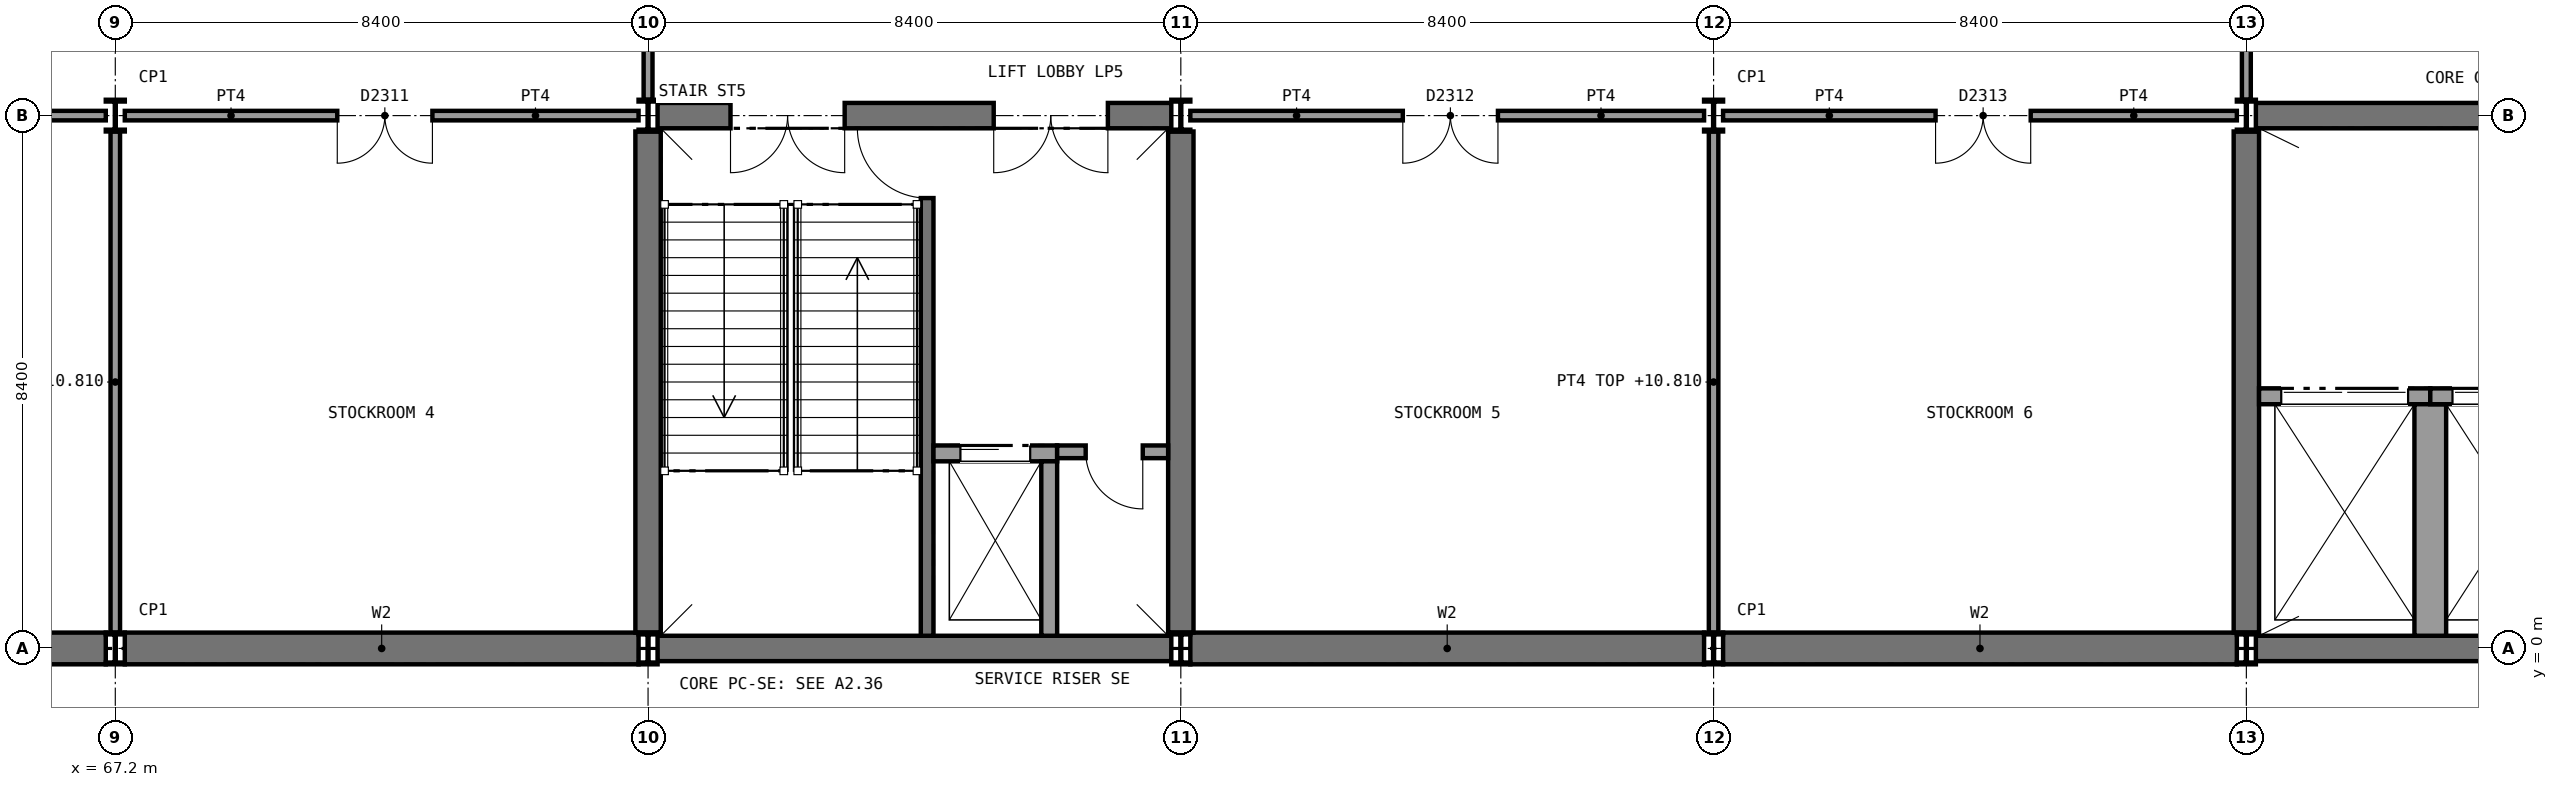
"""IFC4 building model, lengths in metres.
Left out: names, types, materials, properties, quantities, classifications, styles, units other than length and angle.
Written with IfcOpenShell. Run it as: python <this file> out.ifc"""

import sys

from ifc_helpers import new_model, si_unit, direction, frame, frame_2d, origin, origin_2d, place, context, subcontext, project, spatial, rectangle, i_section, extrude, element, fill, save


model = new_model("IFC4")
c1 = context("Model", 3, precision=1e-05, world=origin(), true_north=direction((0.0, 1.0)))
c2 = subcontext(c1, "Body", "Model", "MODEL_VIEW")
j1 = project(units=[si_unit("LENGTHUNIT", "METRE"), si_unit("PLANEANGLEUNIT", "RADIAN")], contexts=[c1])
p1 = place(None, origin())
s1 = spatial("IfcSite", under=j1, at=p1, CompositionType="ELEMENT")
p2 = place(p1, origin())
s2 = spatial("IfcBuilding", under=s1, at=p2, CompositionType="ELEMENT")
p3 = place(p2, frame((0.0, 0.0, 6.0)))
s3 = spatial("IfcBuildingStorey", under=s2, at=p3, CompositionType="ELEMENT", Elevation=6.0)
p4 = place(p3, frame((58.95, 0.0, 0.0), z_axis=(0.0, 0.0, 1.0), x_axis=(1.0, 0.0, 0.0)))
e1 = element("IfcWall", 1, at=p4, inside=s3, PredefinedType="SHEAR", context=c2, shape_type="SweptSolid", body=[
    extrude(rectangle(XDim=8.1, YDim=0.5, at=frame_2d((4.05, 0.0))), origin(), (0.0, 0.0, 1.0), 5.25),
])
p5 = place(p3, frame((67.35, 0.0, 0.0), z_axis=(0.0, 0.0, 1.0), x_axis=(1.0, 0.0, 0.0)))
e2 = element("IfcWall", 2, at=p5, inside=s3, PredefinedType="SHEAR", context=c2, shape_type="SweptSolid", body=[
    extrude(rectangle(XDim=8.1, YDim=0.5, at=frame_2d((4.05, 0.0))), origin(), (0.0, 0.0, 1.0), 5.25),
])
p6 = place(p3, frame((84.15, 0.0, 0.0), z_axis=(0.0, 0.0, 1.0), x_axis=(1.0, 0.0, 0.0)))
e3 = element("IfcWall", 3, at=p6, inside=s3, PredefinedType="SHEAR", context=c2, shape_type="SweptSolid", body=[
    extrude(rectangle(XDim=8.1, YDim=0.5, at=frame_2d((4.05, 0.0))), origin(), (0.0, 0.0, 1.0), 5.25),
])
p7 = place(p3, frame((92.55, 0.0, 0.0), z_axis=(0.0, 0.0, 1.0), x_axis=(1.0, 0.0, 0.0)))
e4 = element("IfcWall", 4, at=p7, inside=s3, PredefinedType="SHEAR", context=c2, shape_type="SweptSolid", body=[
    extrude(rectangle(XDim=8.1, YDim=0.5, at=frame_2d((4.05, 0.0))), origin(), (0.0, 0.0, 1.0), 5.25),
])
p8 = place(p3, frame((75.75, 0.0, 0.0), z_axis=(0.0, 0.0, 1.0), x_axis=(1.0, 0.0, 0.0)))
e5 = element("IfcWall", 5, at=p8, inside=s3, PredefinedType="SHEAR", context=c2, shape_type="SweptSolid", body=[
    extrude(rectangle(XDim=8.1, YDim=0.4, at=frame_2d((4.05, 0.0))), origin(), (0.0, 0.0, 1.0), 5.25),
])
p9 = place(p3, frame((75.75, 8.4, 0.0), z_axis=(0.0, 0.0, 1.0), x_axis=(1.0, 0.0, 0.0)))
e6 = element("IfcWall", 6, at=p9, inside=s3, PredefinedType="SHEAR", context=c2, shape_type="SweptSolid", body=[
    extrude(rectangle(XDim=8.1, YDim=0.4, at=frame_2d((4.05, 0.0))), origin(), (0.0, 0.0, 1.0), 5.25),
])
p10 = place(p9, frame((1.15, 0.0, 0.0)))
e7 = element("IfcOpeningElement", 7, at=p10, cuts=e6, PredefinedType="OPENING", context=c2, shape_type="SweptSolid", body=[
    extrude(rectangle(XDim=1.8, YDim=2.1, at=frame_2d((0.9, 1.05))), frame((0.0, 0.21, 0.0), z_axis=(0.0, -1.0, 0.0), x_axis=(1.0, 0.0, 0.0)), (0.0, 0.0, 1.0), 0.42),
])
p11 = place(p9, frame((5.3, 0.0, 0.0)))
e8 = element("IfcOpeningElement", 8, at=p11, cuts=e6, PredefinedType="OPENING", context=c2, shape_type="SweptSolid", body=[
    extrude(rectangle(XDim=1.8, YDim=2.1, at=frame_2d((0.9, 1.05))), frame((0.0, 0.21, 0.0), z_axis=(0.0, -1.0, 0.0), x_axis=(1.0, 0.0, 0.0)), (0.0, 0.0, 1.0), 0.42),
])
for number, where, z_axis, x_axis in (
    (9, (75.6, 0.25, 0.0), (0.0, 0.0, 1.0), (0.0, 1.0, 0.0)),
    (10, (84.0, 0.25, 0.0), (0.0, 0.0, 1.0), (0.0, 1.0, 0.0)),
):
    element("IfcWall", number, at=place(p3, frame(where, z_axis=z_axis, x_axis=x_axis)), inside=s3, PredefinedType="SHEAR", context=c2, shape_type="SweptSolid", body=[
        extrude(rectangle(XDim=7.9, YDim=0.4, at=frame_2d((3.95, 0.0))), origin(), (0.0, 0.0, 1.0), 5.25),
    ])
p12 = place(p3, frame((100.95, 0.0, 0.0), z_axis=(0.0, 0.0, 1.0), x_axis=(1.0, 0.0, 0.0)))
e11 = element("IfcWall", 11, at=p12, inside=s3, PredefinedType="SHEAR", context=c2, shape_type="SweptSolid", body=[
    extrude(rectangle(XDim=16.4, YDim=0.4, at=frame_2d((8.2, 0.0))), origin(), (0.0, 0.0, 1.0), 5.25),
])
p13 = place(p3, frame((100.95, 8.4, 0.0), z_axis=(0.0, 0.0, 1.0), x_axis=(1.0, 0.0, 0.0)))
e12 = element("IfcWall", 12, at=p13, inside=s3, PredefinedType="SHEAR", context=c2, shape_type="SweptSolid", body=[
    extrude(rectangle(XDim=16.4, YDim=0.4, at=frame_2d((8.2, 0.0))), origin(), (0.0, 0.0, 1.0), 5.25),
])
p14 = place(p13, frame((13.55, 0.0, 0.0)))
e13 = element("IfcOpeningElement", 13, at=p14, cuts=e12, PredefinedType="OPENING", context=c2, shape_type="SweptSolid", body=[
    extrude(rectangle(XDim=1.8, YDim=2.1, at=frame_2d((0.9, 1.05))), frame((0.0, 0.21, 0.0), z_axis=(0.0, -1.0, 0.0), x_axis=(1.0, 0.0, 0.0)), (0.0, 0.0, 1.0), 0.42),
])
p15 = place(p13, frame((4.65, 0.0, 0.0)))
e14 = element("IfcOpeningElement", 14, at=p15, cuts=e12, PredefinedType="OPENING", context=c2, shape_type="SweptSolid", body=[
    extrude(rectangle(XDim=2.4, YDim=2.4, at=frame_2d((1.2, 1.2))), frame((0.0, 0.21, 0.0), z_axis=(0.0, -1.0, 0.0), x_axis=(1.0, 0.0, 0.0)), (0.0, 0.0, 1.0), 0.42),
])
p16 = place(p3, frame((100.8, 0.25, 0.0), z_axis=(0.0, 0.0, 1.0), x_axis=(0.0, 1.0, 0.0)))
e15 = element("IfcWall", 15, at=p16, inside=s3, PredefinedType="SHEAR", context=c2, shape_type="SweptSolid", body=[
    extrude(rectangle(XDim=7.9, YDim=0.4, at=frame_2d((3.95, 0.0))), origin(), (0.0, 0.0, 1.0), 5.25),
])
for number, where, z_axis, x_axis in (
    (16, (67.2, 0.0, 0.0), (0.0, 0.0, 1.0), (1.0, 0.0, 0.0)),
    (17, (67.2, 8.4, 0.0), (0.0, 0.0, 1.0), (1.0, 0.0, 0.0)),
    (18, (75.6, 0.0, 0.0), (0.0, 0.0, 1.0), (1.0, 0.0, 0.0)),
    (19, (75.6, 8.4, 0.0), (0.0, 0.0, 1.0), (1.0, 0.0, 0.0)),
    (20, (84.0, 0.0, 0.0), (0.0, 0.0, 1.0), (1.0, 0.0, 0.0)),
    (21, (84.0, 8.4, 0.0), (0.0, 0.0, 1.0), (1.0, 0.0, 0.0)),
    (22, (92.4, 0.0, 0.0), (0.0, 0.0, 1.0), (1.0, 0.0, 0.0)),
    (23, (92.4, 8.4, 0.0), (0.0, 0.0, 1.0), (1.0, 0.0, 0.0)),
    (24, (100.8, 0.0, 0.0), (0.0, 0.0, 1.0), (1.0, 0.0, 0.0)),
    (25, (100.8, 8.4, 0.0), (0.0, 0.0, 1.0), (1.0, 0.0, 0.0)),
):
    element("IfcColumn", number, at=place(p3, frame(where, z_axis=z_axis, x_axis=x_axis)), inside=s3, PredefinedType="COLUMN", context=c2, shape_type="SweptSolid", body=[
        extrude(i_section(OverallWidth=0.3, OverallDepth=0.5, WebThickness=0.014, FlangeThickness=0.028, FilletRadius=0.027, at=origin_2d()), origin(), (0.0, 0.0, 1.0), 5.4),
    ])
p17 = place(p3, frame((67.2, 0.25, 0.0), z_axis=(0.0, 0.0, 1.0), x_axis=(0.0, 1.0, 0.0)))
e26 = element("IfcWall", 26, at=p17, inside=s3, PredefinedType="SOLIDWALL", context=c2, shape_type="SweptSolid", body=[
    extrude(rectangle(XDim=7.9, YDim=0.15, at=frame_2d((3.95, 0.0))), origin(), (0.0, 0.0, 1.0), 4.81),
])
p18 = place(p3, frame((58.95, 8.4, 0.0), z_axis=(0.0, 0.0, 1.0), x_axis=(1.0, 0.0, 0.0)))
e27 = element("IfcWall", 27, at=p18, inside=s3, PredefinedType="SOLIDWALL", context=c2, shape_type="SweptSolid", body=[
    extrude(rectangle(XDim=8.1, YDim=0.15, at=frame_2d((4.05, 0.0))), origin(), (0.0, 0.0, 1.0), 4.92),
])
p19 = place(p18, frame((3.35, 0.0, 0.0)))
e28 = element("IfcOpeningElement", 28, at=p19, cuts=e27, PredefinedType="OPENING", context=c2, shape_type="SweptSolid", body=[
    extrude(rectangle(XDim=1.5, YDim=2.1, at=frame_2d((0.75, 1.05))), frame((0.0, 0.085, 0.0), z_axis=(0.0, -1.0, 0.0), x_axis=(1.0, 0.0, 0.0)), (0.0, 0.0, 1.0), 0.17),
])
p20 = place(p3, frame((67.35, 8.4, 0.0), z_axis=(0.0, 0.0, 1.0), x_axis=(1.0, 0.0, 0.0)))
e29 = element("IfcWall", 29, at=p20, inside=s3, PredefinedType="SOLIDWALL", context=c2, shape_type="SweptSolid", body=[
    extrude(rectangle(XDim=8.1, YDim=0.15, at=frame_2d((4.05, 0.0))), origin(), (0.0, 0.0, 1.0), 4.92),
])
p21 = place(p20, frame((3.35, 0.0, 0.0)))
e30 = element("IfcOpeningElement", 30, at=p21, cuts=e29, PredefinedType="OPENING", context=c2, shape_type="SweptSolid", body=[
    extrude(rectangle(XDim=1.5, YDim=2.1, at=frame_2d((0.75, 1.05))), frame((0.0, 0.085, 0.0), z_axis=(0.0, -1.0, 0.0), x_axis=(1.0, 0.0, 0.0)), (0.0, 0.0, 1.0), 0.17),
])
p22 = place(p3, frame((92.4, 0.25, 0.0), z_axis=(0.0, 0.0, 1.0), x_axis=(0.0, 1.0, 0.0)))
e31 = element("IfcWall", 31, at=p22, inside=s3, PredefinedType="SOLIDWALL", context=c2, shape_type="SweptSolid", body=[
    extrude(rectangle(XDim=7.9, YDim=0.15, at=frame_2d((3.95, 0.0))), origin(), (0.0, 0.0, 1.0), 4.81),
])
p23 = place(p3, frame((84.15, 8.4, 0.0), z_axis=(0.0, 0.0, 1.0), x_axis=(1.0, 0.0, 0.0)))
e32 = element("IfcWall", 32, at=p23, inside=s3, PredefinedType="SOLIDWALL", context=c2, shape_type="SweptSolid", body=[
    extrude(rectangle(XDim=8.1, YDim=0.15, at=frame_2d((4.05, 0.0))), origin(), (0.0, 0.0, 1.0), 4.92),
])
p24 = place(p23, frame((3.35, 0.0, 0.0)))
e33 = element("IfcOpeningElement", 33, at=p24, cuts=e32, PredefinedType="OPENING", context=c2, shape_type="SweptSolid", body=[
    extrude(rectangle(XDim=1.5, YDim=2.1, at=frame_2d((0.75, 1.05))), frame((0.0, 0.085, 0.0), z_axis=(0.0, -1.0, 0.0), x_axis=(1.0, 0.0, 0.0)), (0.0, 0.0, 1.0), 0.17),
])
p25 = place(p3, frame((92.55, 8.4, 0.0), z_axis=(0.0, 0.0, 1.0), x_axis=(1.0, 0.0, 0.0)))
e34 = element("IfcWall", 34, at=p25, inside=s3, PredefinedType="SOLIDWALL", context=c2, shape_type="SweptSolid", body=[
    extrude(rectangle(XDim=8.1, YDim=0.15, at=frame_2d((4.05, 0.0))), origin(), (0.0, 0.0, 1.0), 4.92),
])
p26 = place(p25, frame((3.35, 0.0, 0.0)))
e35 = element("IfcOpeningElement", 35, at=p26, cuts=e34, PredefinedType="OPENING", context=c2, shape_type="SweptSolid", body=[
    extrude(rectangle(XDim=1.5, YDim=2.1, at=frame_2d((0.75, 1.05))), frame((0.0, 0.085, 0.0), z_axis=(0.0, -1.0, 0.0), x_axis=(1.0, 0.0, 0.0)), (0.0, 0.0, 1.0), 0.17),
])
for number, where, z_axis, x_axis in (
    (36, (75.6, 8.65, 0.0), (0.0, 0.0, 1.0), (0.0, 1.0, 0.0)),
    (37, (100.8, 8.65, 0.0), (0.0, 0.0, 1.0), (0.0, 1.0, 0.0)),
):
    element("IfcWall", number, at=place(p3, frame(where, z_axis=z_axis, x_axis=x_axis)), inside=s3, PredefinedType="PARTITIONING", context=c2, shape_type="SweptSolid", body=[
        extrude(rectangle(XDim=3.1, YDim=0.14, at=frame_2d((1.55, 0.0))), origin(), (0.0, 0.0, 1.0), 4.81),
    ])
p27 = place(p3, frame((80.0, 0.2, 0.0), z_axis=(0.0, 0.0, 1.0), x_axis=(0.0, 1.0, 0.0)))
e38 = element("IfcWall", 38, at=p27, inside=s3, PredefinedType="SHEAR", context=c2, shape_type="SweptSolid", body=[
    extrude(rectangle(XDim=8.0, YDim=0.2, at=frame_2d((4.0, 0.0))), origin(), (0.0, 0.0, 1.0), 5.25),
])
p28 = place(p27, frame((6.9, 0.0, 0.0)))
e39 = element("IfcOpeningElement", 39, at=p28, cuts=e38, PredefinedType="OPENING", context=c2, shape_type="SweptSolid", body=[
    extrude(rectangle(XDim=1.11, YDim=2.1, at=frame_2d((0.555, 1.05))), frame((0.0, 0.11, 0.0), z_axis=(0.0, -1.0, 0.0), x_axis=(1.0, 0.0, 0.0)), (0.0, 0.0, 1.0), 0.22),
])
p29 = place(p3, frame((80.1, 3.075, 0.0), z_axis=(0.0, 0.0, 1.0), x_axis=(1.0, 0.0, 0.0)))
e40 = element("IfcWall", 40, at=p29, inside=s3, PredefinedType="SOLIDWALL", context=c2, shape_type="SweptSolid", body=[
    extrude(rectangle(XDim=1.95, YDim=0.25, at=frame_2d((0.975, 0.0))), origin(), (0.0, 0.0, 1.0), 5.4),
])
p30 = place(p29, frame((0.425, 0.0, 0.0)))
e41 = element("IfcOpeningElement", 41, at=p30, cuts=e40, PredefinedType="OPENING", context=c2, shape_type="SweptSolid", body=[
    extrude(rectangle(XDim=1.1, YDim=2.1, at=frame_2d((0.55, 1.05))), frame((0.0, 0.135, 0.0), z_axis=(0.0, -1.0, 0.0), x_axis=(1.0, 0.0, 0.0)), (0.0, 0.0, 1.0), 0.27),
])
p31 = place(p3, frame((81.925, 0.2, 0.0), z_axis=(0.0, 0.0, 1.0), x_axis=(0.0, 1.0, 0.0)))
e42 = element("IfcWall", 42, at=p31, inside=s3, PredefinedType="SOLIDWALL", context=c2, shape_type="SweptSolid", body=[
    extrude(rectangle(XDim=2.75, YDim=0.25, at=frame_2d((1.375, 0.0))), origin(), (0.0, 0.0, 1.0), 5.4),
])
p32 = place(p3, frame((82.05, 3.1, 0.0), z_axis=(0.0, 0.0, 1.0), x_axis=(1.0, 0.0, 0.0)))
e43 = element("IfcWall", 43, at=p32, inside=s3, PredefinedType="PARTITIONING", context=c2, shape_type="SweptSolid", body=[
    extrude(rectangle(XDim=1.75, YDim=0.2, at=frame_2d((0.875, 0.0))), origin(), (0.0, 0.0, 1.0), 5.25),
])
p33 = place(p32, frame((0.45, 0.0, 0.0)))
e44 = element("IfcOpeningElement", 44, at=p33, cuts=e43, PredefinedType="OPENING", context=c2, shape_type="SweptSolid", body=[
    extrude(rectangle(XDim=0.9, YDim=2.1, at=frame_2d((0.45, 1.05))), frame((0.0, 0.11, 0.0), z_axis=(0.0, -1.0, 0.0), x_axis=(1.0, 0.0, 0.0)), (0.0, 0.0, 1.0), 0.22),
])
p34 = place(p3, frame((101.0, 3.975, 0.0), z_axis=(0.0, 0.0, 1.0), x_axis=(1.0, 0.0, 0.0)))
e45 = element("IfcWall", 45, at=p34, inside=s3, PredefinedType="SOLIDWALL", context=c2, shape_type="SweptSolid", body=[
    extrude(rectangle(XDim=2.7, YDim=0.25, at=frame_2d((1.35, 0.0))), origin(), (0.0, 0.0, 1.0), 5.4),
])
p35 = place(p34, frame((0.35, 0.0, 0.0)))
e46 = element("IfcOpeningElement", 46, at=p35, cuts=e45, PredefinedType="OPENING", context=c2, shape_type="SweptSolid", body=[
    extrude(rectangle(XDim=2.0, YDim=2.2, at=frame_2d((1.0, 1.1))), frame((0.0, 0.135, 0.0), z_axis=(0.0, -1.0, 0.0), x_axis=(1.0, 0.0, 0.0)), (0.0, 0.0, 1.0), 0.27),
])
p36 = place(p3, frame((103.7, 0.2, 0.0), z_axis=(0.0, 0.0, 1.0), x_axis=(0.0, 1.0, 0.0)))
e47 = element("IfcWall", 47, at=p36, inside=s3, PredefinedType="SOLIDWALL", context=c2, shape_type="SweptSolid", body=[
    extrude(rectangle(XDim=3.65, YDim=0.5, at=frame_2d((1.825, 0.0))), origin(), (0.0, 0.0, 1.0), 5.4),
])
p37 = place(p3, frame((103.7, 3.975, 0.0), z_axis=(0.0, 0.0, 1.0), x_axis=(1.0, 0.0, 0.0)))
e48 = element("IfcWall", 48, at=p37, inside=s3, PredefinedType="SOLIDWALL", context=c2, shape_type="SweptSolid", body=[
    extrude(rectangle(XDim=2.7, YDim=0.25, at=frame_2d((1.35, 0.0))), origin(), (0.0, 0.0, 1.0), 5.4),
])
p38 = place(p37, frame((0.35, 0.0, 0.0)))
e49 = element("IfcOpeningElement", 49, at=p38, cuts=e48, PredefinedType="OPENING", context=c2, shape_type="SweptSolid", body=[
    extrude(rectangle(XDim=2.0, YDim=2.2, at=frame_2d((1.0, 1.1))), frame((0.0, 0.135, 0.0), z_axis=(0.0, -1.0, 0.0), x_axis=(1.0, 0.0, 0.0)), (0.0, 0.0, 1.0), 0.27),
])
p39 = place(p21, frame((1.5, 0.0, 0.0), z_axis=(0.0, 0.0, 1.0), x_axis=(-1.0, 0.0, 0.0)))
e50 = element("IfcDoor", 50, at=p39, inside=s3, OperationType="DOUBLE_DOOR_SINGLE_SWING", PredefinedType="DOOR", context=c2, shape_type="SweptSolid", body=[
    extrude(rectangle(XDim=1.5, YDim=2.1, at=frame_2d((0.75, 1.05))), frame((0.0, 0.025, 0.0), z_axis=(0.0, -1.0, 0.0), x_axis=(1.0, 0.0, 0.0)), (0.0, 0.0, 1.0), 0.05),
])
fill(e30, e50)
p40 = place(p24, frame((1.5, 0.0, 0.0), z_axis=(0.0, 0.0, 1.0), x_axis=(-1.0, 0.0, 0.0)))
e51 = element("IfcDoor", 51, at=p40, inside=s3, OperationType="DOUBLE_DOOR_SINGLE_SWING", PredefinedType="DOOR", context=c2, shape_type="SweptSolid", body=[
    extrude(rectangle(XDim=1.5, YDim=2.1, at=frame_2d((0.75, 1.05))), frame((0.0, 0.025, 0.0), z_axis=(0.0, -1.0, 0.0), x_axis=(1.0, 0.0, 0.0)), (0.0, 0.0, 1.0), 0.05),
])
fill(e33, e51)
p41 = place(p26, frame((1.5, 0.0, 0.0), z_axis=(0.0, 0.0, 1.0), x_axis=(-1.0, 0.0, 0.0)))
e52 = element("IfcDoor", 52, at=p41, inside=s3, OperationType="DOUBLE_DOOR_SINGLE_SWING", PredefinedType="DOOR", context=c2, shape_type="SweptSolid", body=[
    extrude(rectangle(XDim=1.5, YDim=2.1, at=frame_2d((0.75, 1.05))), frame((0.0, 0.025, 0.0), z_axis=(0.0, -1.0, 0.0), x_axis=(1.0, 0.0, 0.0)), (0.0, 0.0, 1.0), 0.05),
])
fill(e35, e52)
p42 = place(p28, origin())
e53 = element("IfcDoor", 53, at=p42, inside=s3, OperationType="SINGLE_SWING_RIGHT", PredefinedType="DOOR", context=c2, shape_type="SweptSolid", body=[
    extrude(rectangle(XDim=1.1, YDim=2.1, at=frame_2d((0.55, 1.05))), frame((0.0, 0.025, 0.0), z_axis=(0.0, -1.0, 0.0), x_axis=(1.0, 0.0, 0.0)), (0.0, 0.0, 1.0), 0.05),
])
fill(e39, e53)
p43 = place(p30, origin())
e54 = element("IfcDoor", 54, at=p43, inside=s3, OperationType="SLIDING_TO_LEFT", PredefinedType="DOOR", context=c2, shape_type="SweptSolid", body=[
    extrude(rectangle(XDim=1.1, YDim=2.1, at=frame_2d((0.55, 1.05))), frame((0.0, 0.025, 0.0), z_axis=(0.0, -1.0, 0.0), x_axis=(1.0, 0.0, 0.0)), (0.0, 0.0, 1.0), 0.05),
])
fill(e41, e54)
p44 = place(p33, frame((0.9, 0.0, 0.0), z_axis=(0.0, 0.0, 1.0), x_axis=(-1.0, 0.0, 0.0)))
e55 = element("IfcDoor", 55, at=p44, inside=s3, OperationType="SINGLE_SWING_LEFT", PredefinedType="DOOR", context=c2, shape_type="SweptSolid", body=[
    extrude(rectangle(XDim=0.9, YDim=2.1, at=frame_2d((0.45, 1.05))), frame((0.0, 0.025, 0.0), z_axis=(0.0, -1.0, 0.0), x_axis=(1.0, 0.0, 0.0)), (0.0, 0.0, 1.0), 0.05),
])
fill(e44, e55)
p45 = place(p10, frame((1.8, 0.0, 0.0), z_axis=(0.0, 0.0, 1.0), x_axis=(-1.0, 0.0, 0.0)))
e56 = element("IfcDoor", 56, at=p45, inside=s3, OperationType="DOUBLE_DOOR_SINGLE_SWING", PredefinedType="DOOR", context=c2, shape_type="SweptSolid", body=[
    extrude(rectangle(XDim=1.8, YDim=2.1, at=frame_2d((0.9, 1.05))), frame((0.0, 0.025, 0.0), z_axis=(0.0, -1.0, 0.0), x_axis=(1.0, 0.0, 0.0)), (0.0, 0.0, 1.0), 0.05),
])
fill(e7, e56)
p46 = place(p11, frame((1.8, 0.0, 0.0), z_axis=(0.0, 0.0, 1.0), x_axis=(-1.0, 0.0, 0.0)))
e57 = element("IfcDoor", 57, at=p46, inside=s3, OperationType="DOUBLE_DOOR_SINGLE_SWING", PredefinedType="DOOR", context=c2, shape_type="SweptSolid", body=[
    extrude(rectangle(XDim=1.8, YDim=2.1, at=frame_2d((0.9, 1.05))), frame((0.0, 0.025, 0.0), z_axis=(0.0, -1.0, 0.0), x_axis=(1.0, 0.0, 0.0)), (0.0, 0.0, 1.0), 0.05),
])
fill(e8, e57)
p47 = place(p35, origin())
e58 = element("IfcDoor", 58, at=p47, inside=s3, OperationType="DOUBLE_DOOR_SLIDING", PredefinedType="DOOR", context=c2, shape_type="SweptSolid", body=[
    extrude(rectangle(XDim=2.0, YDim=2.2, at=frame_2d((1.0, 1.1))), frame((0.0, 0.025, 0.0), z_axis=(0.0, -1.0, 0.0), x_axis=(1.0, 0.0, 0.0)), (0.0, 0.0, 1.0), 0.05),
])
fill(e46, e58)
p48 = place(p38, origin())
e59 = element("IfcDoor", 59, at=p48, inside=s3, OperationType="DOUBLE_DOOR_SLIDING", PredefinedType="DOOR", context=c2, shape_type="SweptSolid", body=[
    extrude(rectangle(XDim=2.0, YDim=2.2, at=frame_2d((1.0, 1.1))), frame((0.0, 0.025, 0.0), z_axis=(0.0, -1.0, 0.0), x_axis=(1.0, 0.0, 0.0)), (0.0, 0.0, 1.0), 0.05),
])
fill(e49, e59)
save(model, sys.argv[1])
